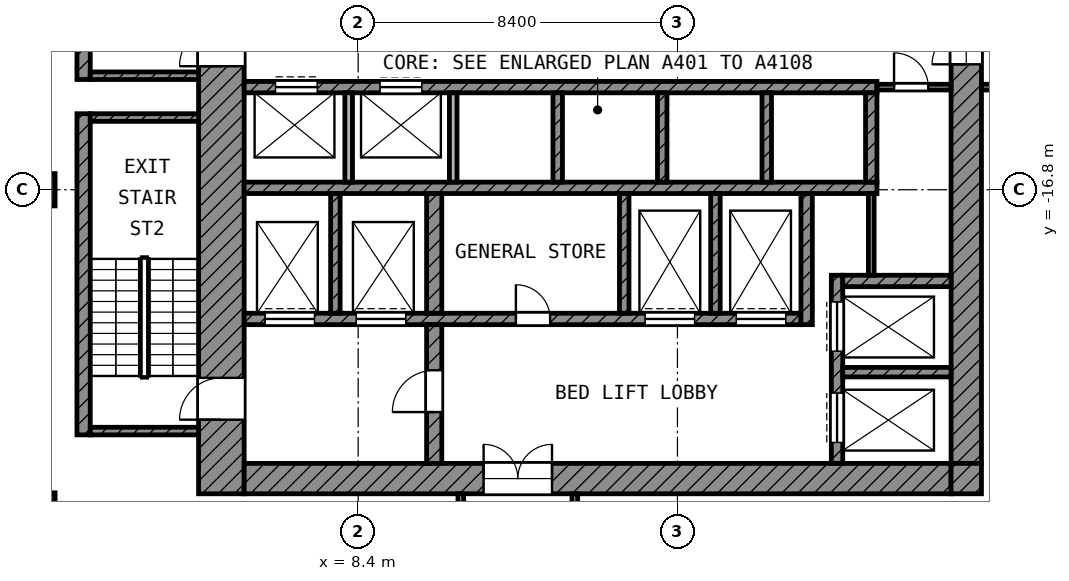
"""IFC4 building model, lengths in metres.
Left out: names, types, materials, properties, quantities, classifications, styles, units other than length and angle.
Written with IfcOpenShell. Run it as: python <this file> out.ifc"""

import sys

from ifc_helpers import new_model, si_unit, direction, frame, frame_2d, origin, origin_2d, place, context, subcontext, project, spatial, rectangle, extrude, element, fill, save


model = new_model("IFC4")
c1 = context("Model", 3, precision=1e-05, world=origin(), true_north=direction((0.0, 1.0)))
c2 = subcontext(c1, "Body", "Model", "MODEL_VIEW")
j1 = project(units=[si_unit("LENGTHUNIT", "METRE"), si_unit("PLANEANGLEUNIT", "RADIAN")], contexts=[c1])
p1 = place(None, origin())
s1 = spatial("IfcSite", under=j1, at=p1, CompositionType="ELEMENT")
p2 = place(p1, origin())
s2 = spatial("IfcBuilding", under=s1, at=p2, CompositionType="ELEMENT")
p3 = place(p2, frame((0.0, 0.0, 251.6)))
s3 = spatial("IfcBuildingStorey", under=s2, at=p3, CompositionType="ELEMENT", Elevation=251.6)
for number, where, z_axis, x_axis in (
    (1, (0.0, -16.8, 0.0), (0.0, 0.0, 1.0), (1.0, 0.0, 0.0)),
    (2, (0.0, -25.2, 0.0), (0.0, 0.0, 1.0), (1.0, 0.0, 0.0)),
):
    element("IfcColumn", number, at=place(p3, frame(where, z_axis=z_axis, x_axis=x_axis)), inside=s3, PredefinedType="COLUMN", context=c2, shape_type="SweptSolid", body=[
        extrude(rectangle(XDim=0.85, YDim=0.85, at=origin_2d()), origin(), (0.0, 0.0, 1.0), 4.2),
    ])
p4 = place(p3, frame((4.8, -24.8, 0.0), z_axis=(0.0, 0.0, 1.0), x_axis=(0.0, 1.0, 0.0)))
e3 = element("IfcWall", 3, at=p4, inside=s3, PredefinedType="SHEAR", context=c2, shape_type="SweptSolid", body=[
    extrude(rectangle(XDim=19.4, YDim=1.2, at=frame_2d((9.7, 0.0))), origin(), (0.0, 0.0, 1.0), 3.6),
])
p5 = place(p4, frame((11.25, 0.0, 0.0)))
e4 = element("IfcOpeningElement", 4, at=p5, cuts=e3, PredefinedType="OPENING", context=c2, shape_type="SweptSolid", body=[
    extrude(rectangle(XDim=1.1, YDim=2.1, at=frame_2d((0.55, 1.05))), frame((0.0, 0.61, 0.0), z_axis=(0.0, -1.0, 0.0), x_axis=(1.0, 0.0, 0.0)), (0.0, 0.0, 1.0), 1.22),
])
p6 = place(p4, frame((1.95, 0.0, 0.0)))
e5 = element("IfcOpeningElement", 5, at=p6, cuts=e3, PredefinedType="OPENING", context=c2, shape_type="SweptSolid", body=[
    extrude(rectangle(XDim=1.1, YDim=2.1, at=frame_2d((0.55, 1.05))), frame((0.0, 0.61, 0.0), z_axis=(0.0, -1.0, 0.0), x_axis=(1.0, 0.0, 0.0)), (0.0, 0.0, 1.0), 1.22),
])
p7 = place(p3, frame((24.4, -24.0, 0.0), z_axis=(0.0, 0.0, 1.0), x_axis=(0.0, 1.0, 0.0)))
e6 = element("IfcWall", 6, at=p7, inside=s3, PredefinedType="SHEAR", context=c2, shape_type="SweptSolid", body=[
    extrude(rectangle(XDim=18.6, YDim=0.8, at=frame_2d((9.3, 0.0))), origin(), (0.0, 0.0, 1.0), 3.6),
])
p8 = place(p7, frame((10.5, 0.0, 0.0)))
e7 = element("IfcOpeningElement", 7, at=p8, cuts=e6, PredefinedType="OPENING", context=c2, shape_type="SweptSolid", body=[
    extrude(rectangle(XDim=1.8, YDim=2.1, at=frame_2d((0.9, 1.05))), frame((0.0, 0.41, 0.0), z_axis=(0.0, -1.0, 0.0), x_axis=(1.0, 0.0, 0.0)), (0.0, 0.0, 1.0), 0.82),
])
p9 = place(p3, frame((5.4, -24.4, 0.0), z_axis=(0.0, 0.0, 1.0), x_axis=(1.0, 0.0, 0.0)))
e8 = element("IfcWall", 8, at=p9, inside=s3, PredefinedType="SHEAR", context=c2, shape_type="SweptSolid", body=[
    extrude(rectangle(XDim=18.6, YDim=0.8, at=frame_2d((9.3, 0.0))), origin(), (0.0, 0.0, 1.0), 3.6),
])
p10 = place(p9, frame((6.3, 0.0, 0.0)))
e9 = element("IfcOpeningElement", 9, at=p10, cuts=e8, PredefinedType="OPENING", context=c2, shape_type="SweptSolid", body=[
    extrude(rectangle(XDim=1.8, YDim=2.1, at=frame_2d((0.9, 1.05))), frame((0.0, 0.41, 0.0), z_axis=(0.0, -1.0, 0.0), x_axis=(1.0, 0.0, 0.0)), (0.0, 0.0, 1.0), 0.82),
])
p11 = place(p3, frame((24.4, -24.8, 0.0), z_axis=(0.0, 0.0, 1.0), x_axis=(0.0, 1.0, 0.0)))
e10 = element("IfcWall", 10, at=p11, inside=s3, PredefinedType="SHEAR", context=c2, shape_type="SweptSolid", body=[
    extrude(rectangle(XDim=0.8, YDim=0.8, at=frame_2d((0.4, 0.0))), origin(), (0.0, 0.0, 1.0), 3.6),
])
p12 = place(p3, frame((5.4, -14.1, 0.0), z_axis=(0.0, 0.0, 1.0), x_axis=(1.0, 0.0, 0.0)))
e11 = element("IfcWall", 11, at=p12, inside=s3, PredefinedType="SHEAR", context=c2, shape_type="SweptSolid", body=[
    extrude(rectangle(XDim=16.65, YDim=0.3, at=frame_2d((8.325, 0.0))), origin(), (0.0, 0.0, 1.0), 3.6),
])
p13 = place(p12, frame((0.825, 0.0, 0.0)))
e12 = element("IfcOpeningElement", 12, at=p13, cuts=e11, PredefinedType="OPENING", context=c2, shape_type="SweptSolid", body=[
    extrude(rectangle(XDim=1.1, YDim=2.1, at=frame_2d((0.55, 1.05))), frame((0.0, 0.16, 0.0), z_axis=(0.0, -1.0, 0.0), x_axis=(1.0, 0.0, 0.0)), (0.0, 0.0, 1.0), 0.32),
])
p14 = place(p12, frame((3.575, 0.0, 0.0)))
e13 = element("IfcOpeningElement", 13, at=p14, cuts=e11, PredefinedType="OPENING", context=c2, shape_type="SweptSolid", body=[
    extrude(rectangle(XDim=1.1, YDim=2.1, at=frame_2d((0.55, 1.05))), frame((0.0, 0.16, 0.0), z_axis=(0.0, -1.0, 0.0), x_axis=(1.0, 0.0, 0.0)), (0.0, 0.0, 1.0), 0.32),
])
p15 = place(p3, frame((5.4, -16.75, 0.0), z_axis=(0.0, 0.0, 1.0), x_axis=(1.0, 0.0, 0.0)))
e14 = element("IfcWall", 14, at=p15, inside=s3, PredefinedType="SHEAR", context=c2, shape_type="SweptSolid", body=[
    extrude(rectangle(XDim=16.65, YDim=0.3, at=frame_2d((8.325, 0.0))), origin(), (0.0, 0.0, 1.0), 3.6),
])
p16 = place(p3, frame((5.4, -20.2, 0.0), z_axis=(0.0, 0.0, 1.0), x_axis=(1.0, 0.0, 0.0)))
e15 = element("IfcWall", 15, at=p16, inside=s3, PredefinedType="SHEAR", context=c2, shape_type="SweptSolid", body=[
    extrude(rectangle(XDim=14.65, YDim=0.3, at=frame_2d((7.325, 0.0))), origin(), (0.0, 0.0, 1.0), 3.6),
])
p17 = place(p16, frame((10.55, 0.0, 0.0)))
e16 = element("IfcOpeningElement", 16, at=p17, cuts=e15, PredefinedType="OPENING", context=c2, shape_type="SweptSolid", body=[
    extrude(rectangle(XDim=1.3, YDim=2.1, at=frame_2d((0.65, 1.05))), frame((0.0, 0.16, 0.0), z_axis=(0.0, -1.0, 0.0), x_axis=(1.0, 0.0, 0.0)), (0.0, 0.0, 1.0), 0.32),
])
p18 = place(p16, frame((12.95, 0.0, 0.0)))
e17 = element("IfcOpeningElement", 17, at=p18, cuts=e15, PredefinedType="OPENING", context=c2, shape_type="SweptSolid", body=[
    extrude(rectangle(XDim=1.3, YDim=2.1, at=frame_2d((0.65, 1.05))), frame((0.0, 0.16, 0.0), z_axis=(0.0, -1.0, 0.0), x_axis=(1.0, 0.0, 0.0)), (0.0, 0.0, 1.0), 0.32),
])
p19 = place(p16, frame((0.55, 0.0, 0.0)))
e18 = element("IfcOpeningElement", 18, at=p19, cuts=e15, PredefinedType="OPENING", context=c2, shape_type="SweptSolid", body=[
    extrude(rectangle(XDim=1.3, YDim=2.1, at=frame_2d((0.65, 1.05))), frame((0.0, 0.16, 0.0), z_axis=(0.0, -1.0, 0.0), x_axis=(1.0, 0.0, 0.0)), (0.0, 0.0, 1.0), 0.32),
])
p20 = place(p16, frame((2.95, 0.0, 0.0)))
e19 = element("IfcOpeningElement", 19, at=p20, cuts=e15, PredefinedType="OPENING", context=c2, shape_type="SweptSolid", body=[
    extrude(rectangle(XDim=1.3, YDim=2.1, at=frame_2d((0.65, 1.05))), frame((0.0, 0.16, 0.0), z_axis=(0.0, -1.0, 0.0), x_axis=(1.0, 0.0, 0.0)), (0.0, 0.0, 1.0), 0.32),
])
p21 = place(p16, frame((7.15, 0.0, 0.0)))
e20 = element("IfcOpeningElement", 20, at=p21, cuts=e15, PredefinedType="OPENING", context=c2, shape_type="SweptSolid", body=[
    extrude(rectangle(XDim=0.9, YDim=2.1, at=frame_2d((0.45, 1.05))), frame((0.0, 0.16, 0.0), z_axis=(0.0, -1.0, 0.0), x_axis=(1.0, 0.0, 0.0)), (0.0, 0.0, 1.0), 0.32),
])
p22 = place(p3, frame((10.4, -24.0, 0.0), z_axis=(0.0, 0.0, 1.0), x_axis=(0.0, 1.0, 0.0)))
e21 = element("IfcWall", 21, at=p22, inside=s3, PredefinedType="SHEAR", context=c2, shape_type="SweptSolid", body=[
    extrude(rectangle(XDim=3.65, YDim=0.4, at=frame_2d((1.825, 0.0))), origin(), (0.0, 0.0, 1.0), 3.6),
])
p23 = place(p22, frame((1.35, 0.0, 0.0)))
e22 = element("IfcOpeningElement", 22, at=p23, cuts=e21, PredefinedType="OPENING", context=c2, shape_type="SweptSolid", body=[
    extrude(rectangle(XDim=1.1, YDim=2.1, at=frame_2d((0.55, 1.05))), frame((0.0, 0.21, 0.0), z_axis=(0.0, -1.0, 0.0), x_axis=(1.0, 0.0, 0.0)), (0.0, 0.0, 1.0), 0.42),
])
p24 = place(p3, frame((10.4, -20.05, 0.0), z_axis=(0.0, 0.0, 1.0), x_axis=(0.0, 1.0, 0.0)))
e23 = element("IfcWall", 23, at=p24, inside=s3, PredefinedType="SHEAR", context=c2, shape_type="SweptSolid", body=[
    extrude(rectangle(XDim=3.15, YDim=0.4, at=frame_2d((1.575, 0.0))), origin(), (0.0, 0.0, 1.0), 3.6),
])
p25 = place(p3, frame((20.2, -20.35, 0.0), z_axis=(0.0, 0.0, 1.0), x_axis=(0.0, 1.0, 0.0)))
e24 = element("IfcWall", 24, at=p25, inside=s3, PredefinedType="SHEAR", context=c2, shape_type="SweptSolid", body=[
    extrude(rectangle(XDim=3.45, YDim=0.3, at=frame_2d((1.725, 0.0))), origin(), (0.0, 0.0, 1.0), 3.6),
])
p26 = place(p3, frame((21.9, -16.6, 0.0), z_axis=(0.0, 0.0, 1.0), x_axis=(0.0, 1.0, 0.0)))
e25 = element("IfcWall", 25, at=p26, inside=s3, PredefinedType="SHEAR", context=c2, shape_type="SweptSolid", body=[
    extrude(rectangle(XDim=2.35, YDim=0.3, at=frame_2d((1.175, 0.0))), origin(), (0.0, 0.0, 1.0), 3.6),
])
p27 = place(p3, frame((21.15, -19.2, 0.0), z_axis=(0.0, 0.0, 1.0), x_axis=(1.0, 0.0, 0.0)))
e26 = element("IfcWall", 26, at=p27, inside=s3, PredefinedType="SHEAR", context=c2, shape_type="SweptSolid", body=[
    extrude(rectangle(XDim=2.85, YDim=0.3, at=frame_2d((1.425, 0.0))), origin(), (0.0, 0.0, 1.0), 3.6),
])
p28 = place(p3, frame((21.0, -24.0, 0.0), z_axis=(0.0, 0.0, 1.0), x_axis=(0.0, 1.0, 0.0)))
e27 = element("IfcWall", 27, at=p28, inside=s3, PredefinedType="SHEAR", context=c2, shape_type="SweptSolid", body=[
    extrude(rectangle(XDim=4.95, YDim=0.3, at=frame_2d((2.475, 0.0))), origin(), (0.0, 0.0, 1.0), 3.6),
])
p29 = place(p28, frame((2.95, 0.0, 0.0)))
e28 = element("IfcOpeningElement", 28, at=p29, cuts=e27, PredefinedType="OPENING", context=c2, shape_type="SweptSolid", body=[
    extrude(rectangle(XDim=1.3, YDim=2.1, at=frame_2d((0.65, 1.05))), frame((0.0, 0.16, 0.0), z_axis=(0.0, -1.0, 0.0), x_axis=(1.0, 0.0, 0.0)), (0.0, 0.0, 1.0), 0.32),
])
p30 = place(p28, frame((0.55, 0.0, 0.0)))
e29 = element("IfcOpeningElement", 29, at=p30, cuts=e27, PredefinedType="OPENING", context=c2, shape_type="SweptSolid", body=[
    extrude(rectangle(XDim=1.3, YDim=2.1, at=frame_2d((0.65, 1.05))), frame((0.0, 0.16, 0.0), z_axis=(0.0, -1.0, 0.0), x_axis=(1.0, 0.0, 0.0)), (0.0, 0.0, 1.0), 0.32),
])
p31 = place(p3, frame((21.15, -21.6, 0.0), z_axis=(0.0, 0.0, 1.0), x_axis=(1.0, 0.0, 0.0)))
e30 = element("IfcWall", 30, at=p31, inside=s3, PredefinedType="SHEAR", context=c2, shape_type="SweptSolid", body=[
    extrude(rectangle(XDim=2.85, YDim=0.25, at=frame_2d((1.425, 0.0))), origin(), (0.0, 0.0, 1.0), 3.6),
])
for number, where, z_axis, x_axis in (
    (31, (7.8, -20.05, 0.0), (0.0, 0.0, 1.0), (0.0, 1.0, 0.0)),
    (32, (15.4, -20.05, 0.0), (0.0, 0.0, 1.0), (0.0, 1.0, 0.0)),
    (33, (17.8, -20.05, 0.0), (0.0, 0.0, 1.0), (0.0, 1.0, 0.0)),
):
    element("IfcWall", number, at=place(p3, frame(where, z_axis=z_axis, x_axis=x_axis)), inside=s3, PredefinedType="SHEAR", context=c2, shape_type="SweptSolid", body=[
        extrude(rectangle(XDim=3.15, YDim=0.25, at=frame_2d((1.575, 0.0))), origin(), (0.0, 0.0, 1.0), 3.6),
    ])
for number, where, z_axis, x_axis in (
    (34, (8.15, -16.6, 0.0), (0.0, 0.0, 1.0), (0.0, 1.0, 0.0)),
    (35, (10.9, -16.6, 0.0), (0.0, 0.0, 1.0), (0.0, 1.0, 0.0)),
):
    element("IfcWall", number, at=place(p3, frame(where, z_axis=z_axis, x_axis=x_axis)), inside=s3, PredefinedType="PARTITIONING", context=c2, shape_type="SweptSolid", body=[
        extrude(rectangle(XDim=2.35, YDim=0.2, at=frame_2d((1.175, 0.0))), origin(), (0.0, 0.0, 1.0), 3.6),
    ])
for number, where, z_axis, x_axis in (
    (36, (13.65, -16.6, 0.0), (0.0, 0.0, 1.0), (0.0, 1.0, 0.0)),
    (37, (16.4, -16.6, 0.0), (0.0, 0.0, 1.0), (0.0, 1.0, 0.0)),
    (38, (19.15, -16.6, 0.0), (0.0, 0.0, 1.0), (0.0, 1.0, 0.0)),
):
    element("IfcWall", number, at=place(p3, frame(where, z_axis=z_axis, x_axis=x_axis)), inside=s3, PredefinedType="SHEAR", context=c2, shape_type="SweptSolid", body=[
        extrude(rectangle(XDim=2.35, YDim=0.25, at=frame_2d((1.175, 0.0))), origin(), (0.0, 0.0, 1.0), 3.6),
    ])
p32 = place(p3, frame((21.9, -19.05, 0.0), z_axis=(0.0, 0.0, 1.0), x_axis=(0.0, 1.0, 0.0)))
e39 = element("IfcWall", 39, at=p32, inside=s3, PredefinedType="PARTITIONING", context=c2, shape_type="SweptSolid", body=[
    extrude(rectangle(XDim=2.15, YDim=0.15, at=frame_2d((1.075, 0.0))), origin(), (0.0, 0.0, 1.0), 3.6),
])
p33 = place(p3, frame((22.05, -14.1, 0.0), z_axis=(0.0, 0.0, 1.0), x_axis=(1.0, 0.0, 0.0)))
e40 = element("IfcWall", 40, at=p33, inside=s3, PredefinedType="PARTITIONING", context=c2, shape_type="SweptSolid", body=[
    extrude(rectangle(XDim=1.95, YDim=0.15, at=frame_2d((0.975, 0.0))), origin(), (0.0, 0.0, 1.0), 3.6),
])
p34 = place(p33, frame((0.45, 0.0, 0.0)))
e41 = element("IfcOpeningElement", 41, at=p34, cuts=e40, PredefinedType="OPENING", context=c2, shape_type="SweptSolid", body=[
    extrude(rectangle(XDim=0.9, YDim=2.1, at=frame_2d((0.45, 1.05))), frame((0.0, 0.085, 0.0), z_axis=(0.0, -1.0, 0.0), x_axis=(1.0, 0.0, 0.0)), (0.0, 0.0, 1.0), 0.17),
])
p35 = place(p3, frame((1.175, -13.9, 0.0), z_axis=(0.0, 0.0, 1.0), x_axis=(0.0, 1.0, 0.0)))
e42 = element("IfcWall", 42, at=p35, inside=s3, PredefinedType="SHEAR", context=c2, shape_type="SweptSolid", body=[
    extrude(rectangle(XDim=8.45, YDim=0.35, at=frame_2d((4.225, 0.0))), origin(), (0.0, 0.0, 1.0), 3.6),
])
p36 = place(p3, frame((1.35, -13.8, 0.0), z_axis=(0.0, 0.0, 1.0), x_axis=(1.0, 0.0, 0.0)))
e43 = element("IfcWall", 43, at=p36, inside=s3, PredefinedType="SHEAR", context=c2, shape_type="SweptSolid", body=[
    extrude(rectangle(XDim=2.85, YDim=0.2, at=frame_2d((1.425, 0.0))), origin(), (0.0, 0.0, 1.0), 3.6),
])
p37 = place(p3, frame((1.175, -23.25, 0.0), z_axis=(0.0, 0.0, 1.0), x_axis=(0.0, 1.0, 0.0)))
e44 = element("IfcWall", 44, at=p37, inside=s3, PredefinedType="SHEAR", context=c2, shape_type="SweptSolid", body=[
    extrude(rectangle(XDim=8.45, YDim=0.35, at=frame_2d((4.225, 0.0))), origin(), (0.0, 0.0, 1.0), 3.6),
])
for number, where, z_axis, x_axis in (
    (45, (1.35, -14.9, 0.0), (0.0, 0.0, 1.0), (1.0, 0.0, 0.0)),
    (46, (1.35, -23.15, 0.0), (0.0, 0.0, 1.0), (1.0, 0.0, 0.0)),
):
    element("IfcWall", number, at=place(p3, frame(where, z_axis=z_axis, x_axis=x_axis)), inside=s3, PredefinedType="SHEAR", context=c2, shape_type="SweptSolid", body=[
        extrude(rectangle(XDim=2.85, YDim=0.2, at=frame_2d((1.425, 0.0))), origin(), (0.0, 0.0, 1.0), 3.6),
    ])
p38 = place(p3, frame((24.8, -14.1, 0.0), z_axis=(0.0, 0.0, 1.0), x_axis=(1.0, 0.0, 0.0)))
e47 = element("IfcWall", 47, at=p38, inside=s3, PredefinedType="PARTITIONING", context=c2, shape_type="SweptSolid", body=[
    extrude(rectangle(XDim=4.525, YDim=0.15, at=frame_2d((2.262, 0.0))), origin(), (0.0, 0.0, 1.0), 3.6),
])
p39 = place(p38, frame((1.75, 0.0, 0.0)))
e48 = element("IfcOpeningElement", 48, at=p39, cuts=e47, PredefinedType="OPENING", context=c2, shape_type="SweptSolid", body=[
    extrude(rectangle(XDim=1.5, YDim=2.1, at=frame_2d((0.75, 1.05))), frame((0.0, 0.085, 0.0), z_axis=(0.0, -1.0, 0.0), x_axis=(1.0, 0.0, 0.0)), (0.0, 0.0, 1.0), 0.17),
])
p40 = place(p3, frame((11.1, -29.397, 0.0), z_axis=(0.0, 0.0, 1.0), x_axis=(0.0, 1.0, 0.0)))
e49 = element("IfcWall", 49, at=p40, inside=s3, PredefinedType="PARTITIONING", context=c2, shape_type="SweptSolid", body=[
    extrude(rectangle(XDim=4.597, YDim=0.15, at=frame_2d((2.298, 0.0))), origin(), (0.0, 0.0, 1.0), 3.6),
])
p41 = place(p40, frame((1.897, 0.0, 0.0)))
e50 = element("IfcOpeningElement", 50, at=p41, cuts=e49, PredefinedType="OPENING", context=c2, shape_type="SweptSolid", body=[
    extrude(rectangle(XDim=1.0, YDim=2.1, at=frame_2d((0.5, 1.05))), frame((0.0, 0.085, 0.0), z_axis=(0.0, -1.0, 0.0), x_axis=(1.0, 0.0, 0.0)), (0.0, 0.0, 1.0), 0.17),
])
p42 = place(p3, frame((14.1, -29.4, 0.0), z_axis=(0.0, 0.0, 1.0), x_axis=(0.0, 1.0, 0.0)))
e51 = element("IfcWall", 51, at=p42, inside=s3, PredefinedType="PARTITIONING", context=c2, shape_type="SweptSolid", body=[
    extrude(rectangle(XDim=4.6, YDim=0.15, at=frame_2d((2.3, 0.0))), origin(), (0.0, 0.0, 1.0), 3.6),
])
p43 = place(p13, origin())
e52 = element("IfcDoor", 52, at=p43, inside=s3, OperationType="DOUBLE_DOOR_SLIDING", PredefinedType="DOOR", context=c2, shape_type="SweptSolid", body=[
    extrude(rectangle(XDim=1.1, YDim=2.1, at=frame_2d((0.55, 1.05))), frame((0.0, 0.025, 0.0), z_axis=(0.0, -1.0, 0.0), x_axis=(1.0, 0.0, 0.0)), (0.0, 0.0, 1.0), 0.05),
])
fill(e12, e52)
p44 = place(p14, origin())
e53 = element("IfcDoor", 53, at=p44, inside=s3, OperationType="DOUBLE_DOOR_SLIDING", PredefinedType="DOOR", context=c2, shape_type="SweptSolid", body=[
    extrude(rectangle(XDim=1.1, YDim=2.1, at=frame_2d((0.55, 1.05))), frame((0.0, 0.025, 0.0), z_axis=(0.0, -1.0, 0.0), x_axis=(1.0, 0.0, 0.0)), (0.0, 0.0, 1.0), 0.05),
])
fill(e13, e53)
p45 = place(p29, origin())
e54 = element("IfcDoor", 54, at=p45, inside=s3, OperationType="DOUBLE_DOOR_SLIDING", PredefinedType="DOOR", context=c2, shape_type="SweptSolid", body=[
    extrude(rectangle(XDim=1.3, YDim=2.1, at=frame_2d((0.65, 1.05))), frame((0.0, 0.025, 0.0), z_axis=(0.0, -1.0, 0.0), x_axis=(1.0, 0.0, 0.0)), (0.0, 0.0, 1.0), 0.05),
])
fill(e28, e54)
p46 = place(p30, origin())
e55 = element("IfcDoor", 55, at=p46, inside=s3, OperationType="DOUBLE_DOOR_SLIDING", PredefinedType="DOOR", context=c2, shape_type="SweptSolid", body=[
    extrude(rectangle(XDim=1.3, YDim=2.1, at=frame_2d((0.65, 1.05))), frame((0.0, 0.025, 0.0), z_axis=(0.0, -1.0, 0.0), x_axis=(1.0, 0.0, 0.0)), (0.0, 0.0, 1.0), 0.05),
])
fill(e29, e55)
p47 = place(p17, origin())
e56 = element("IfcDoor", 56, at=p47, inside=s3, OperationType="DOUBLE_DOOR_SLIDING", PredefinedType="DOOR", context=c2, shape_type="SweptSolid", body=[
    extrude(rectangle(XDim=1.3, YDim=2.1, at=frame_2d((0.65, 1.05))), frame((0.0, 0.025, 0.0), z_axis=(0.0, -1.0, 0.0), x_axis=(1.0, 0.0, 0.0)), (0.0, 0.0, 1.0), 0.05),
])
fill(e16, e56)
p48 = place(p18, origin())
e57 = element("IfcDoor", 57, at=p48, inside=s3, OperationType="DOUBLE_DOOR_SLIDING", PredefinedType="DOOR", context=c2, shape_type="SweptSolid", body=[
    extrude(rectangle(XDim=1.3, YDim=2.1, at=frame_2d((0.65, 1.05))), frame((0.0, 0.025, 0.0), z_axis=(0.0, -1.0, 0.0), x_axis=(1.0, 0.0, 0.0)), (0.0, 0.0, 1.0), 0.05),
])
fill(e17, e57)
p49 = place(p19, origin())
e58 = element("IfcDoor", 58, at=p49, inside=s3, OperationType="DOUBLE_DOOR_SLIDING", PredefinedType="DOOR", context=c2, shape_type="SweptSolid", body=[
    extrude(rectangle(XDim=1.3, YDim=2.1, at=frame_2d((0.65, 1.05))), frame((0.0, 0.025, 0.0), z_axis=(0.0, -1.0, 0.0), x_axis=(1.0, 0.0, 0.0)), (0.0, 0.0, 1.0), 0.05),
])
fill(e18, e58)
p50 = place(p20, origin())
e59 = element("IfcDoor", 59, at=p50, inside=s3, OperationType="DOUBLE_DOOR_SLIDING", PredefinedType="DOOR", context=c2, shape_type="SweptSolid", body=[
    extrude(rectangle(XDim=1.3, YDim=2.1, at=frame_2d((0.65, 1.05))), frame((0.0, 0.025, 0.0), z_axis=(0.0, -1.0, 0.0), x_axis=(1.0, 0.0, 0.0)), (0.0, 0.0, 1.0), 0.05),
])
fill(e19, e59)
p51 = place(p5, origin())
e60 = element("IfcDoor", 60, at=p51, inside=s3, OperationType="SINGLE_SWING_LEFT", PredefinedType="DOOR", context=c2, shape_type="SweptSolid", body=[
    extrude(rectangle(XDim=1.1, YDim=2.1, at=frame_2d((0.55, 1.05))), frame((0.0, 0.025, 0.0), z_axis=(0.0, -1.0, 0.0), x_axis=(1.0, 0.0, 0.0)), (0.0, 0.0, 1.0), 0.05),
])
fill(e4, e60)
p52 = place(p6, origin())
e61 = element("IfcDoor", 61, at=p52, inside=s3, OperationType="SINGLE_SWING_LEFT", PredefinedType="DOOR", context=c2, shape_type="SweptSolid", body=[
    extrude(rectangle(XDim=1.1, YDim=2.1, at=frame_2d((0.55, 1.05))), frame((0.0, 0.025, 0.0), z_axis=(0.0, -1.0, 0.0), x_axis=(1.0, 0.0, 0.0)), (0.0, 0.0, 1.0), 0.05),
])
fill(e5, e61)
p53 = place(p23, origin())
e62 = element("IfcDoor", 62, at=p53, inside=s3, OperationType="SINGLE_SWING_LEFT", PredefinedType="DOOR", context=c2, shape_type="SweptSolid", body=[
    extrude(rectangle(XDim=1.1, YDim=2.1, at=frame_2d((0.55, 1.05))), frame((0.0, 0.025, 0.0), z_axis=(0.0, -1.0, 0.0), x_axis=(1.0, 0.0, 0.0)), (0.0, 0.0, 1.0), 0.05),
])
fill(e22, e62)
p54 = place(p8, origin())
e63 = element("IfcDoor", 63, at=p54, inside=s3, OperationType="DOUBLE_DOOR_SINGLE_SWING", PredefinedType="DOOR", context=c2, shape_type="SweptSolid", body=[
    extrude(rectangle(XDim=1.8, YDim=2.1, at=frame_2d((0.9, 1.05))), frame((0.0, 0.025, 0.0), z_axis=(0.0, -1.0, 0.0), x_axis=(1.0, 0.0, 0.0)), (0.0, 0.0, 1.0), 0.05),
])
fill(e7, e63)
p55 = place(p10, origin())
e64 = element("IfcDoor", 64, at=p55, inside=s3, OperationType="DOUBLE_DOOR_SINGLE_SWING", PredefinedType="DOOR", context=c2, shape_type="SweptSolid", body=[
    extrude(rectangle(XDim=1.8, YDim=2.1, at=frame_2d((0.9, 1.05))), frame((0.0, 0.025, 0.0), z_axis=(0.0, -1.0, 0.0), x_axis=(1.0, 0.0, 0.0)), (0.0, 0.0, 1.0), 0.05),
])
fill(e9, e64)
p56 = place(p34, origin())
e65 = element("IfcDoor", 65, at=p56, inside=s3, OperationType="SINGLE_SWING_LEFT", PredefinedType="DOOR", context=c2, shape_type="SweptSolid", body=[
    extrude(rectangle(XDim=0.9, YDim=2.1, at=frame_2d((0.45, 1.05))), frame((0.0, 0.025, 0.0), z_axis=(0.0, -1.0, 0.0), x_axis=(1.0, 0.0, 0.0)), (0.0, 0.0, 1.0), 0.05),
])
fill(e41, e65)
p57 = place(p21, origin())
e66 = element("IfcDoor", 66, at=p57, inside=s3, OperationType="SINGLE_SWING_LEFT", PredefinedType="DOOR", context=c2, shape_type="SweptSolid", body=[
    extrude(rectangle(XDim=0.9, YDim=2.1, at=frame_2d((0.45, 1.05))), frame((0.0, 0.025, 0.0), z_axis=(0.0, -1.0, 0.0), x_axis=(1.0, 0.0, 0.0)), (0.0, 0.0, 1.0), 0.05),
])
fill(e20, e66)
save(model, sys.argv[1])
